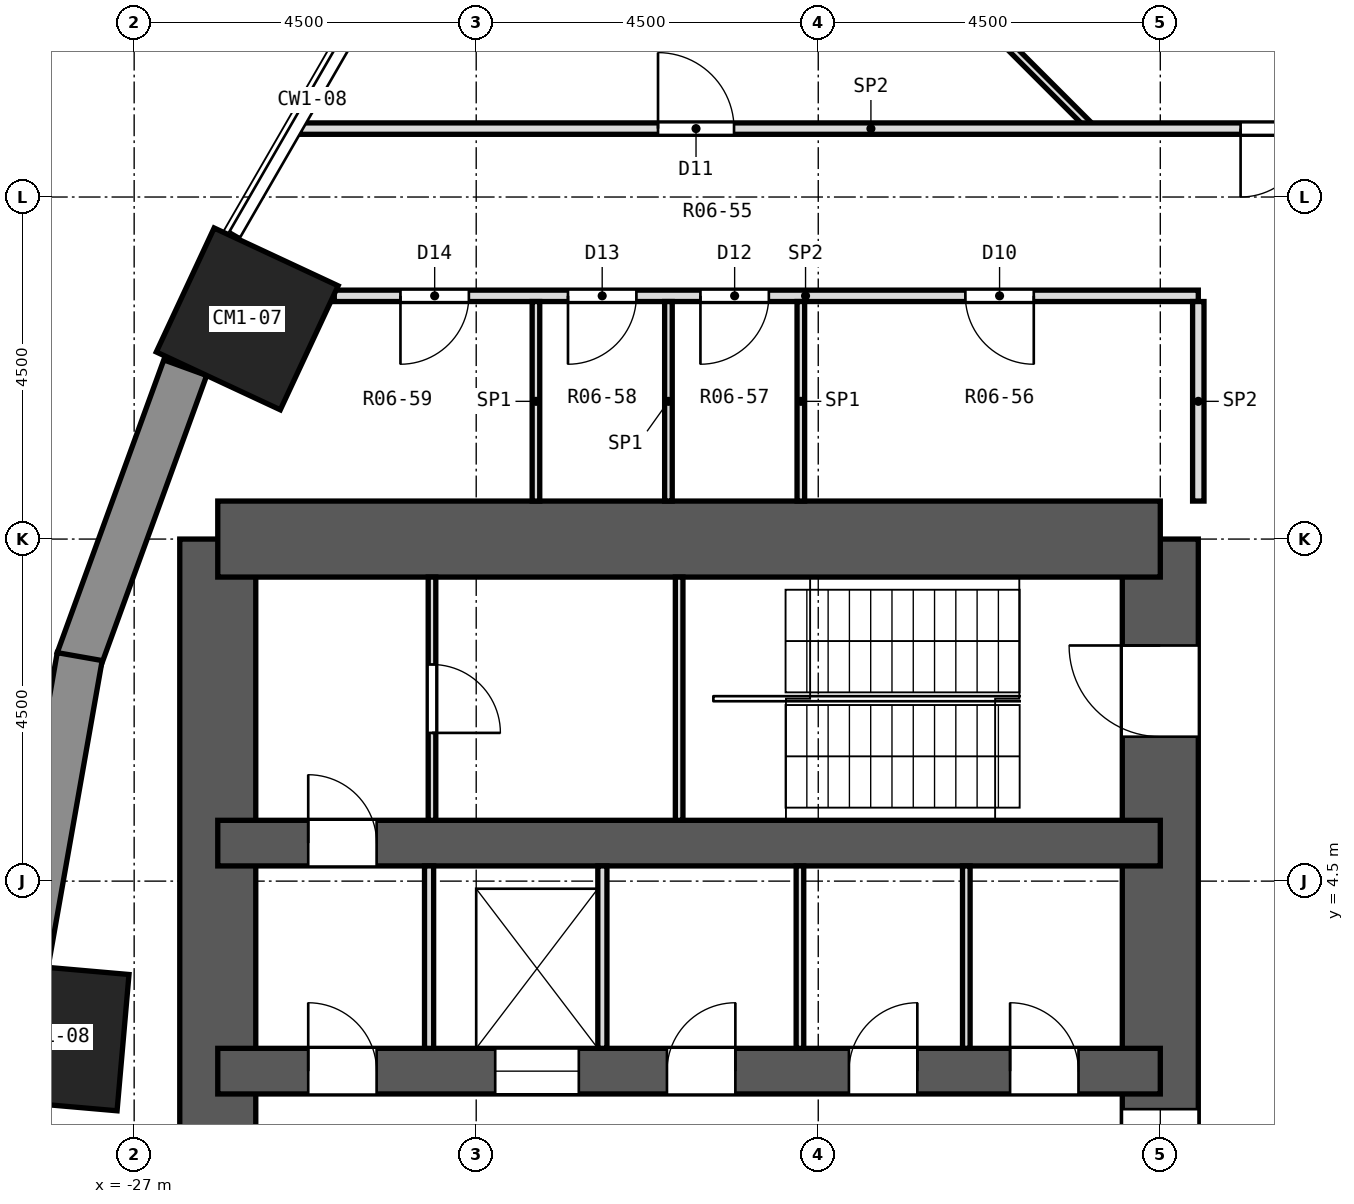
"""IFC4 building model, lengths in metres.
Left out: names, types, materials, properties, quantities, classifications, styles, units other than length and angle.
Written with IfcOpenShell. Run it as: python <this file> out.ifc"""

import sys

from ifc_helpers import new_model, si_unit, direction, frame, frame_2d, origin, origin_2d, place, context, subcontext, project, spatial, rectangle, extrude, element, fill, save


model = new_model("IFC4")
c1 = context("Model", 3, precision=1e-05, world=origin(), true_north=direction((0.0, 1.0)))
c2 = subcontext(c1, "Body", "Model", "MODEL_VIEW")
j1 = project(units=[si_unit("LENGTHUNIT", "METRE"), si_unit("PLANEANGLEUNIT", "RADIAN")], contexts=[c1])
p1 = place(None, origin())
s1 = spatial("IfcSite", under=j1, at=p1, CompositionType="ELEMENT")
p2 = place(p1, origin())
s2 = spatial("IfcBuilding", under=s1, at=p2, CompositionType="ELEMENT")
p3 = place(p2, frame((0.0, 0.0, 13.4)))
s3 = spatial("IfcBuildingStorey", under=s2, at=p3, CompositionType="ELEMENT", Elevation=13.4)
for number, where, z_axis, x_axis in (
    (1, (-25.512, 11.897, 0.0), (0.0, 0.0, 1.0), (-0.906, 0.423, 0.0)),
    (2, (-28.043, 2.453, 0.0), (0.0, 0.0, 1.0), (-0.996, 0.087, 0.0)),
):
    element("IfcColumn", number, at=place(p3, frame(where, z_axis=z_axis, x_axis=x_axis)), inside=s3, PredefinedType="COLUMN", context=c2, shape_type="SweptSolid", body=[
        extrude(rectangle(XDim=1.8, YDim=1.8, at=origin_2d()), origin(), (0.0, 0.0, 1.0), 4.2),
    ])
p4 = place(p3, frame((-13.5, -9.0, 0.0), z_axis=(0.0, 0.0, 1.0), x_axis=(0.0, 1.0, 0.0)))
e3 = element("IfcWall", 3, at=p4, inside=s3, PredefinedType="SHEAR", context=c2, shape_type="SweptSolid", body=[
    extrude(rectangle(XDim=18.0, YDim=1.0, at=frame_2d((9.0, 0.0))), origin(), (0.0, 0.0, 1.0), 4.2),
])
p5 = place(p4, frame((15.4, 0.0, 0.0)))
e4 = element("IfcOpeningElement", 4, at=p5, cuts=e3, PredefinedType="OPENING", context=c2, shape_type="SweptSolid", body=[
    extrude(rectangle(XDim=1.2, YDim=2.1, at=frame_2d((0.6, 1.05))), frame((0.0, 0.512, 0.0), z_axis=(0.0, -1.0, 0.0), x_axis=(1.0, 0.0, 0.0)), (0.0, 0.0, 1.0), 1.024),
])
p6 = place(p4, frame((1.4, 0.0, 0.0)))
e5 = element("IfcOpeningElement", 5, at=p6, cuts=e3, PredefinedType="OPENING", context=c2, shape_type="SweptSolid", body=[
    extrude(rectangle(XDim=1.2, YDim=2.1, at=frame_2d((0.6, 1.05))), frame((0.0, 0.512, 0.0), z_axis=(0.0, -1.0, 0.0), x_axis=(1.0, 0.0, 0.0)), (0.0, 0.0, 1.0), 1.024),
])
p7 = place(p4, frame((7.5, 0.0, 0.0)))
e6 = element("IfcOpeningElement", 6, at=p7, cuts=e3, PredefinedType="OPENING", context=c2, shape_type="SweptSolid", body=[
    extrude(rectangle(XDim=3.0, YDim=2.4, at=frame_2d((1.5, 1.2))), frame((0.0, 0.512, 0.0), z_axis=(0.0, -1.0, 0.0), x_axis=(1.0, 0.0, 0.0)), (0.0, 0.0, 1.0), 1.024),
])
p8 = place(p3, frame((-25.9, -9.0, 0.0), z_axis=(0.0, 0.0, 1.0), x_axis=(0.0, 1.0, 0.0)))
e7 = element("IfcWall", 7, at=p8, inside=s3, PredefinedType="SHEAR", context=c2, shape_type="SweptSolid", body=[
    extrude(rectangle(XDim=18.0, YDim=1.0, at=frame_2d((9.0, 0.0))), origin(), (0.0, 0.0, 1.0), 4.2),
])
p9 = place(p3, frame((-13.5, 9.0, 0.0), z_axis=(0.0, 0.0, 1.0), x_axis=(-1.0, 0.0, 0.0)))
e8 = element("IfcWall", 8, at=p9, inside=s3, PredefinedType="SHEAR", context=c2, shape_type="SweptSolid", body=[
    extrude(rectangle(XDim=12.4, YDim=1.0, at=frame_2d((6.2, 0.0))), origin(), (0.0, 0.0, 1.0), 4.2),
])
p10 = place(p3, frame((-13.5, 5.0, 0.0), z_axis=(0.0, 0.0, 1.0), x_axis=(-1.0, 0.0, 0.0)))
e9 = element("IfcWall", 9, at=p10, inside=s3, PredefinedType="SHEAR", context=c2, shape_type="SweptSolid", body=[
    extrude(rectangle(XDim=12.4, YDim=0.6, at=frame_2d((6.2, 0.0))), origin(), (0.0, 0.0, 1.0), 4.2),
])
p11 = place(p10, frame((10.31, 0.0, 0.0)))
e10 = element("IfcOpeningElement", 10, at=p11, cuts=e9, PredefinedType="OPENING", context=c2, shape_type="SweptSolid", body=[
    extrude(rectangle(XDim=0.9, YDim=2.1, at=frame_2d((0.45, 1.05))), frame((0.0, 0.312, 0.0), z_axis=(0.0, -1.0, 0.0), x_axis=(1.0, 0.0, 0.0)), (0.0, 0.0, 1.0), 0.624),
])
p12 = place(p3, frame((-13.5, 2.0, 0.0), z_axis=(0.0, 0.0, 1.0), x_axis=(-1.0, 0.0, 0.0)))
e11 = element("IfcWall", 11, at=p12, inside=s3, PredefinedType="SHEAR", context=c2, shape_type="SweptSolid", body=[
    extrude(rectangle(XDim=12.4, YDim=0.6, at=frame_2d((6.2, 0.0))), origin(), (0.0, 0.0, 1.0), 4.2),
])
p13 = place(p12, frame((7.65, 0.0, 0.0)))
e12 = element("IfcOpeningElement", 12, at=p13, cuts=e11, PredefinedType="OPENING", context=c2, shape_type="SweptSolid", body=[
    extrude(rectangle(XDim=1.1, YDim=2.1, at=frame_2d((0.55, 1.05))), frame((0.0, 0.312, 0.0), z_axis=(0.0, -1.0, 0.0), x_axis=(1.0, 0.0, 0.0)), (0.0, 0.0, 1.0), 0.624),
])
p14 = place(p12, frame((1.076, 0.0, 0.0)))
e13 = element("IfcOpeningElement", 13, at=p14, cuts=e11, PredefinedType="OPENING", context=c2, shape_type="SweptSolid", body=[
    extrude(rectangle(XDim=0.9, YDim=2.1, at=frame_2d((0.45, 1.05))), frame((0.0, 0.312, 0.0), z_axis=(0.0, -1.0, 0.0), x_axis=(1.0, 0.0, 0.0)), (0.0, 0.0, 1.0), 0.624),
])
p15 = place(p12, frame((3.196, 0.0, 0.0)))
e14 = element("IfcOpeningElement", 14, at=p15, cuts=e11, PredefinedType="OPENING", context=c2, shape_type="SweptSolid", body=[
    extrude(rectangle(XDim=0.9, YDim=2.1, at=frame_2d((0.45, 1.05))), frame((0.0, 0.312, 0.0), z_axis=(0.0, -1.0, 0.0), x_axis=(1.0, 0.0, 0.0)), (0.0, 0.0, 1.0), 0.624),
])
p16 = place(p12, frame((5.59, 0.0, 0.0)))
e15 = element("IfcOpeningElement", 15, at=p16, cuts=e11, PredefinedType="OPENING", context=c2, shape_type="SweptSolid", body=[
    extrude(rectangle(XDim=0.9, YDim=2.1, at=frame_2d((0.45, 1.05))), frame((0.0, 0.312, 0.0), z_axis=(0.0, -1.0, 0.0), x_axis=(1.0, 0.0, 0.0)), (0.0, 0.0, 1.0), 0.624),
])
p17 = place(p12, frame((10.31, 0.0, 0.0)))
e16 = element("IfcOpeningElement", 16, at=p17, cuts=e11, PredefinedType="OPENING", context=c2, shape_type="SweptSolid", body=[
    extrude(rectangle(XDim=0.9, YDim=2.1, at=frame_2d((0.45, 1.05))), frame((0.0, 0.312, 0.0), z_axis=(0.0, -1.0, 0.0), x_axis=(1.0, 0.0, 0.0)), (0.0, 0.0, 1.0), 0.624),
])
p18 = place(p3, frame((-26.328, 11.255, 0.0), z_axis=(0.0, 0.0, 1.0), x_axis=(-0.342034744565, -0.939687306241, 0.0)))
e17 = element("IfcWall", 17, at=p18, inside=s3, PredefinedType="SOLIDWALL", context=c2, shape_type="SweptSolid", body=[
    extrude(rectangle(XDim=4.099, YDim=0.6, at=frame_2d((2.05, 0.0))), origin(), (0.0, 0.0, 1.0), 3.65),
])
p19 = place(p3, frame((-27.716, 7.454, 0.0), z_axis=(0.0, 0.0, 1.0), x_axis=(-0.173673210505, -0.984803338719, 0.0)))
e18 = element("IfcWall", 18, at=p19, inside=s3, PredefinedType="SOLIDWALL", context=c2, shape_type="SweptSolid", body=[
    extrude(rectangle(XDim=4.099, YDim=0.6, at=frame_2d((2.05, 0.0))), origin(), (0.0, 0.0, 1.0), 3.65),
])
p20 = place(p3, frame((-16.519, 23.591, 0.0), z_axis=(0.0, 0.0, 1.0), x_axis=(0.573601998214, -0.819134145086, 0.0)))
e19 = element("IfcWall", 19, at=p20, inside=s3, PredefinedType="PARTITIONING", context=c2, shape_type="SweptSolid", body=[
    extrude(rectangle(XDim=11.146, YDim=0.1, at=frame_2d((5.573, 0.0))), origin(), (0.0, 0.0, 1.0), 3.65),
])
p21 = place(p20, frame((5.11, 0.0, 0.0)))
e20 = element("IfcOpeningElement", 20, at=p21, cuts=e19, PredefinedType="OPENING", context=c2, shape_type="SweptSolid", body=[
    extrude(rectangle(XDim=1.0, YDim=2.1, at=frame_2d((0.5, 1.05))), frame((0.0, 0.062, 0.0), z_axis=(0.0, -1.0, 0.0), x_axis=(1.0, 0.0, 0.0)), (0.0, 0.0, 1.0), 0.124),
])
p22 = place(p3, frame((-19.262, 19.262, 0.0), z_axis=(0.0, 0.0, 1.0), x_axis=(0.707196525799, -0.707017025183, 0.0)))
e21 = element("IfcWall", 21, at=p22, inside=s3, PredefinedType="PARTITIONING", context=c2, shape_type="SweptSolid", body=[
    extrude(rectangle(XDim=6.801, YDim=0.1, at=frame_2d((3.4, 0.0))), origin(), (0.0, 0.0, 1.0), 3.65),
])
p23 = place(p3, frame((-24.367, 12.2, 0.0), z_axis=(0.0, 0.0, 1.0), x_axis=(1.0, 0.0, 0.0)))
e22 = element("IfcWall", 22, at=p23, inside=s3, PredefinedType="PARTITIONING", context=c2, shape_type="SweptSolid", body=[
    extrude(rectangle(XDim=11.367, YDim=0.15, at=frame_2d((5.684, 0.0))), origin(), (0.0, 0.0, 1.0), 3.65),
])
p24 = place(p23, frame((8.302, 0.0, 0.0)))
e23 = element("IfcOpeningElement", 23, at=p24, cuts=e22, PredefinedType="OPENING", context=c2, shape_type="SweptSolid", body=[
    extrude(rectangle(XDim=0.9, YDim=2.1, at=frame_2d((0.45, 1.05))), frame((0.0, 0.087, 0.0), z_axis=(0.0, -1.0, 0.0), x_axis=(1.0, 0.0, 0.0)), (0.0, 0.0, 1.0), 0.174),
])
p25 = place(p23, frame((4.817, 0.0, 0.0)))
e24 = element("IfcOpeningElement", 24, at=p25, cuts=e22, PredefinedType="OPENING", context=c2, shape_type="SweptSolid", body=[
    extrude(rectangle(XDim=0.9, YDim=2.1, at=frame_2d((0.45, 1.05))), frame((0.0, 0.087, 0.0), z_axis=(0.0, -1.0, 0.0), x_axis=(1.0, 0.0, 0.0)), (0.0, 0.0, 1.0), 0.174),
])
p26 = place(p23, frame((3.075, 0.0, 0.0)))
e25 = element("IfcOpeningElement", 25, at=p26, cuts=e22, PredefinedType="OPENING", context=c2, shape_type="SweptSolid", body=[
    extrude(rectangle(XDim=0.9, YDim=2.1, at=frame_2d((0.45, 1.05))), frame((0.0, 0.087, 0.0), z_axis=(0.0, -1.0, 0.0), x_axis=(1.0, 0.0, 0.0)), (0.0, 0.0, 1.0), 0.174),
])
p27 = place(p23, frame((0.871, 0.0, 0.0)))
e26 = element("IfcOpeningElement", 26, at=p27, cuts=e22, PredefinedType="OPENING", context=c2, shape_type="SweptSolid", body=[
    extrude(rectangle(XDim=0.9, YDim=2.1, at=frame_2d((0.45, 1.05))), frame((0.0, 0.087, 0.0), z_axis=(0.0, -1.0, 0.0), x_axis=(1.0, 0.0, 0.0)), (0.0, 0.0, 1.0), 0.174),
])
p28 = place(p3, frame((-24.814, 14.4, 0.0), z_axis=(0.0, 0.0, 1.0), x_axis=(1.0, 0.0, 0.0)))
e27 = element("IfcWall", 27, at=p28, inside=s3, PredefinedType="PARTITIONING", context=c2, shape_type="SweptSolid", body=[
    extrude(rectangle(XDim=15.014, YDim=0.15, at=frame_2d((7.507, 0.0))), origin(), (0.0, 0.0, 1.0), 3.65),
])
p29 = place(p28, frame((12.371, 0.0, 0.0)))
e28 = element("IfcOpeningElement", 28, at=p29, cuts=e27, PredefinedType="OPENING", context=c2, shape_type="SweptSolid", body=[
    extrude(rectangle(XDim=1.8, YDim=2.1, at=frame_2d((0.9, 1.05))), frame((0.0, 0.087, 0.0), z_axis=(0.0, -1.0, 0.0), x_axis=(1.0, 0.0, 0.0)), (0.0, 0.0, 1.0), 0.174),
])
p30 = place(p28, frame((4.706, 0.0, 0.0)))
e29 = element("IfcOpeningElement", 29, at=p30, cuts=e27, PredefinedType="OPENING", context=c2, shape_type="SweptSolid", body=[
    extrude(rectangle(XDim=1.0, YDim=2.1, at=frame_2d((0.5, 1.05))), frame((0.0, 0.087, 0.0), z_axis=(0.0, -1.0, 0.0), x_axis=(1.0, 0.0, 0.0)), (0.0, 0.0, 1.0), 0.174),
])
p31 = place(p3, frame((-13.0, 9.5, 0.0), z_axis=(0.0, 0.0, 1.0), x_axis=(0.0, 1.0, 0.0)))
e30 = element("IfcWall", 30, at=p31, inside=s3, PredefinedType="PARTITIONING", context=c2, shape_type="SweptSolid", body=[
    extrude(rectangle(XDim=2.625, YDim=0.15, at=frame_2d((1.312, 0.0))), origin(), (0.0, 0.0, 1.0), 3.65),
])
for number, where, z_axis, x_axis in (
    (31, (-18.229, 9.5, 0.0), (0.0, 0.0, 1.0), (0.0, 1.0, 0.0)),
    (32, (-19.971, 9.5, 0.0), (0.0, 0.0, 1.0), (0.0, 1.0, 0.0)),
    (33, (-21.714, 9.5, 0.0), (0.0, 0.0, 1.0), (0.0, 1.0, 0.0)),
):
    element("IfcWall", number, at=place(p3, frame(where, z_axis=z_axis, x_axis=x_axis)), inside=s3, PredefinedType="PARTITIONING", context=c2, shape_type="SweptSolid", body=[
        extrude(rectangle(XDim=2.625, YDim=0.1, at=frame_2d((1.312, 0.0))), origin(), (0.0, 0.0, 1.0), 3.65),
    ])
for number, where, z_axis, x_axis in (
    (34, (-16.052, 2.3, 0.0), (0.0, 0.0, 1.0), (0.0, 1.0, 0.0)),
    (35, (-18.241, 2.3, 0.0), (0.0, 0.0, 1.0), (0.0, 1.0, 0.0)),
):
    element("IfcWall", number, at=place(p3, frame(where, z_axis=z_axis, x_axis=x_axis)), inside=s3, PredefinedType="PARTITIONING", context=c2, shape_type="SweptSolid", body=[
        extrude(rectangle(XDim=2.4, YDim=0.1, at=frame_2d((1.2, 0.0))), origin(), (0.0, 0.0, 1.0), 3.65),
    ])
for number, where, z_axis, x_axis in (
    (36, (-20.84, 2.3, 0.0), (0.0, 0.0, 1.0), (0.0, 1.0, 0.0)),
    (37, (-23.12, 2.3, 0.0), (0.0, 0.0, 1.0), (0.0, 1.0, 0.0)),
):
    element("IfcWall", number, at=place(p3, frame(where, z_axis=z_axis, x_axis=x_axis)), inside=s3, PredefinedType="PARTITIONING", context=c2, shape_type="SweptSolid", body=[
        extrude(rectangle(XDim=2.4, YDim=0.12, at=frame_2d((1.2, 0.0))), origin(), (0.0, 0.0, 1.0), 3.65),
    ])
p32 = place(p3, frame((-19.83, 5.3, 0.0), z_axis=(0.0, 0.0, 1.0), x_axis=(0.0, 1.0, 0.0)))
e38 = element("IfcWall", 38, at=p32, inside=s3, PredefinedType="PARTITIONING", context=c2, shape_type="SweptSolid", body=[
    extrude(rectangle(XDim=3.2, YDim=0.1, at=frame_2d((1.6, 0.0))), origin(), (0.0, 0.0, 1.0), 3.65),
])
p33 = place(p3, frame((-23.082, 5.3, 0.0), z_axis=(0.0, 0.0, 1.0), x_axis=(0.0, 1.0, 0.0)))
e39 = element("IfcWall", 39, at=p33, inside=s3, PredefinedType="PARTITIONING", context=c2, shape_type="SweptSolid", body=[
    extrude(rectangle(XDim=3.2, YDim=0.1, at=frame_2d((1.6, 0.0))), origin(), (0.0, 0.0, 1.0), 3.65),
])
p34 = place(p33, frame((1.15, 0.0, 0.0)))
e40 = element("IfcOpeningElement", 40, at=p34, cuts=e39, PredefinedType="OPENING", context=c2, shape_type="SweptSolid", body=[
    extrude(rectangle(XDim=0.9, YDim=2.1, at=frame_2d((0.45, 1.05))), frame((0.0, 0.062, 0.0), z_axis=(0.0, -1.0, 0.0), x_axis=(1.0, 0.0, 0.0)), (0.0, 0.0, 1.0), 0.124),
])
p35 = place(p29, frame((1.8, 0.0, 0.0), z_axis=(0.0, 0.0, 1.0), x_axis=(-1.0, 0.0, 0.0)))
e41 = element("IfcDoor", 41, at=p35, inside=s3, OperationType="DOUBLE_DOOR_SINGLE_SWING", PredefinedType="DOOR", context=c2, shape_type="SweptSolid", body=[
    extrude(rectangle(XDim=1.8, YDim=2.1, at=frame_2d((0.9, 1.05))), frame((0.0, 0.025, 0.0), z_axis=(0.0, -1.0, 0.0), x_axis=(1.0, 0.0, 0.0)), (0.0, 0.0, 1.0), 0.05),
])
fill(e28, e41)
p36 = place(p24, frame((0.9, 0.0, 0.0), z_axis=(0.0, 0.0, 1.0), x_axis=(-1.0, 0.0, 0.0)))
e42 = element("IfcDoor", 42, at=p36, inside=s3, OperationType="SINGLE_SWING_LEFT", PredefinedType="DOOR", context=c2, shape_type="SweptSolid", body=[
    extrude(rectangle(XDim=0.9, YDim=2.1, at=frame_2d((0.45, 1.05))), frame((0.0, 0.025, 0.0), z_axis=(0.0, -1.0, 0.0), x_axis=(1.0, 0.0, 0.0)), (0.0, 0.0, 1.0), 0.05),
])
fill(e23, e42)
p37 = place(p30, origin())
e43 = element("IfcDoor", 43, at=p37, inside=s3, OperationType="SINGLE_SWING_LEFT", PredefinedType="DOOR", context=c2, shape_type="SweptSolid", body=[
    extrude(rectangle(XDim=1.0, YDim=2.1, at=frame_2d((0.5, 1.05))), frame((0.0, 0.025, 0.0), z_axis=(0.0, -1.0, 0.0), x_axis=(1.0, 0.0, 0.0)), (0.0, 0.0, 1.0), 0.05),
])
fill(e29, e43)
p38 = place(p25, frame((0.9, 0.0, 0.0), z_axis=(0.0, 0.0, 1.0), x_axis=(-1.0, 0.0, 0.0)))
e44 = element("IfcDoor", 44, at=p38, inside=s3, OperationType="SINGLE_SWING_RIGHT", PredefinedType="DOOR", context=c2, shape_type="SweptSolid", body=[
    extrude(rectangle(XDim=0.9, YDim=2.1, at=frame_2d((0.45, 1.05))), frame((0.0, 0.025, 0.0), z_axis=(0.0, -1.0, 0.0), x_axis=(1.0, 0.0, 0.0)), (0.0, 0.0, 1.0), 0.05),
])
fill(e24, e44)
p39 = place(p26, frame((0.9, 0.0, 0.0), z_axis=(0.0, 0.0, 1.0), x_axis=(-1.0, 0.0, 0.0)))
e45 = element("IfcDoor", 45, at=p39, inside=s3, OperationType="SINGLE_SWING_RIGHT", PredefinedType="DOOR", context=c2, shape_type="SweptSolid", body=[
    extrude(rectangle(XDim=0.9, YDim=2.1, at=frame_2d((0.45, 1.05))), frame((0.0, 0.025, 0.0), z_axis=(0.0, -1.0, 0.0), x_axis=(1.0, 0.0, 0.0)), (0.0, 0.0, 1.0), 0.05),
])
fill(e25, e45)
p40 = place(p27, frame((0.9, 0.0, 0.0), z_axis=(0.0, 0.0, 1.0), x_axis=(-1.0, 0.0, 0.0)))
e46 = element("IfcDoor", 46, at=p40, inside=s3, OperationType="SINGLE_SWING_RIGHT", PredefinedType="DOOR", context=c2, shape_type="SweptSolid", body=[
    extrude(rectangle(XDim=0.9, YDim=2.1, at=frame_2d((0.45, 1.05))), frame((0.0, 0.025, 0.0), z_axis=(0.0, -1.0, 0.0), x_axis=(1.0, 0.0, 0.0)), (0.0, 0.0, 1.0), 0.05),
])
fill(e26, e46)
p41 = place(p13, origin())
e47 = element("IfcDoor", 47, at=p41, inside=s3, OperationType="DOUBLE_DOOR_SLIDING", PredefinedType="DOOR", context=c2, shape_type="SweptSolid", body=[
    extrude(rectangle(XDim=1.1, YDim=2.1, at=frame_2d((0.55, 1.05))), frame((0.0, 0.025, 0.0), z_axis=(0.0, -1.0, 0.0), x_axis=(1.0, 0.0, 0.0)), (0.0, 0.0, 1.0), 0.05),
])
fill(e12, e47)
p42 = place(p14, frame((0.9, 0.0, 0.0), z_axis=(0.0, 0.0, 1.0), x_axis=(-1.0, 0.0, 0.0)))
e48 = element("IfcDoor", 48, at=p42, inside=s3, OperationType="SINGLE_SWING_LEFT", PredefinedType="DOOR", context=c2, shape_type="SweptSolid", body=[
    extrude(rectangle(XDim=0.9, YDim=2.1, at=frame_2d((0.45, 1.05))), frame((0.0, 0.025, 0.0), z_axis=(0.0, -1.0, 0.0), x_axis=(1.0, 0.0, 0.0)), (0.0, 0.0, 1.0), 0.05),
])
fill(e13, e48)
p43 = place(p15, frame((0.9, 0.0, 0.0), z_axis=(0.0, 0.0, 1.0), x_axis=(-1.0, 0.0, 0.0)))
e49 = element("IfcDoor", 49, at=p43, inside=s3, OperationType="SINGLE_SWING_RIGHT", PredefinedType="DOOR", context=c2, shape_type="SweptSolid", body=[
    extrude(rectangle(XDim=0.9, YDim=2.1, at=frame_2d((0.45, 1.05))), frame((0.0, 0.025, 0.0), z_axis=(0.0, -1.0, 0.0), x_axis=(1.0, 0.0, 0.0)), (0.0, 0.0, 1.0), 0.05),
])
fill(e14, e49)
p44 = place(p16, frame((0.9, 0.0, 0.0), z_axis=(0.0, 0.0, 1.0), x_axis=(-1.0, 0.0, 0.0)))
e50 = element("IfcDoor", 50, at=p44, inside=s3, OperationType="SINGLE_SWING_RIGHT", PredefinedType="DOOR", context=c2, shape_type="SweptSolid", body=[
    extrude(rectangle(XDim=0.9, YDim=2.1, at=frame_2d((0.45, 1.05))), frame((0.0, 0.025, 0.0), z_axis=(0.0, -1.0, 0.0), x_axis=(1.0, 0.0, 0.0)), (0.0, 0.0, 1.0), 0.05),
])
fill(e15, e50)
p45 = place(p17, frame((0.9, 0.0, 0.0), z_axis=(0.0, 0.0, 1.0), x_axis=(-1.0, 0.0, 0.0)))
e51 = element("IfcDoor", 51, at=p45, inside=s3, OperationType="SINGLE_SWING_LEFT", PredefinedType="DOOR", context=c2, shape_type="SweptSolid", body=[
    extrude(rectangle(XDim=0.9, YDim=2.1, at=frame_2d((0.45, 1.05))), frame((0.0, 0.025, 0.0), z_axis=(0.0, -1.0, 0.0), x_axis=(1.0, 0.0, 0.0)), (0.0, 0.0, 1.0), 0.05),
])
fill(e16, e51)
p46 = place(p34, frame((0.9, 0.0, 0.0), z_axis=(0.0, 0.0, 1.0), x_axis=(-1.0, 0.0, 0.0)))
e52 = element("IfcDoor", 52, at=p46, inside=s3, OperationType="SINGLE_SWING_RIGHT", PredefinedType="DOOR", context=c2, shape_type="SweptSolid", body=[
    extrude(rectangle(XDim=0.9, YDim=2.1, at=frame_2d((0.45, 1.05))), frame((0.0, 0.025, 0.0), z_axis=(0.0, -1.0, 0.0), x_axis=(1.0, 0.0, 0.0)), (0.0, 0.0, 1.0), 0.05),
])
fill(e40, e52)
p47 = place(p11, frame((0.9, 0.0, 0.0), z_axis=(0.0, 0.0, 1.0), x_axis=(-1.0, 0.0, 0.0)))
e53 = element("IfcDoor", 53, at=p47, inside=s3, OperationType="SINGLE_SWING_LEFT", PredefinedType="DOOR", context=c2, shape_type="SweptSolid", body=[
    extrude(rectangle(XDim=0.9, YDim=2.1, at=frame_2d((0.45, 1.05))), frame((0.0, 0.025, 0.0), z_axis=(0.0, -1.0, 0.0), x_axis=(1.0, 0.0, 0.0)), (0.0, 0.0, 1.0), 0.05),
])
fill(e10, e53)
p48 = place(p5, origin())
e54 = element("IfcDoor", 54, at=p48, inside=s3, OperationType="SINGLE_SWING_RIGHT", PredefinedType="DOOR", context=c2, shape_type="SweptSolid", body=[
    extrude(rectangle(XDim=1.2, YDim=2.1, at=frame_2d((0.6, 1.05))), frame((0.0, 0.025, 0.0), z_axis=(0.0, -1.0, 0.0), x_axis=(1.0, 0.0, 0.0)), (0.0, 0.0, 1.0), 0.05),
])
fill(e4, e54)
p49 = place(p7, origin())
e55 = element("IfcDoor", 55, at=p49, inside=s3, OperationType="DOUBLE_DOOR_SLIDING", PredefinedType="DOOR", context=c2, shape_type="SweptSolid", body=[
    extrude(rectangle(XDim=3.0, YDim=2.4, at=frame_2d((1.5, 1.2))), frame((0.0, 0.025, 0.0), z_axis=(0.0, -1.0, 0.0), x_axis=(1.0, 0.0, 0.0)), (0.0, 0.0, 1.0), 0.05),
])
fill(e6, e55)
save(model, sys.argv[1])
